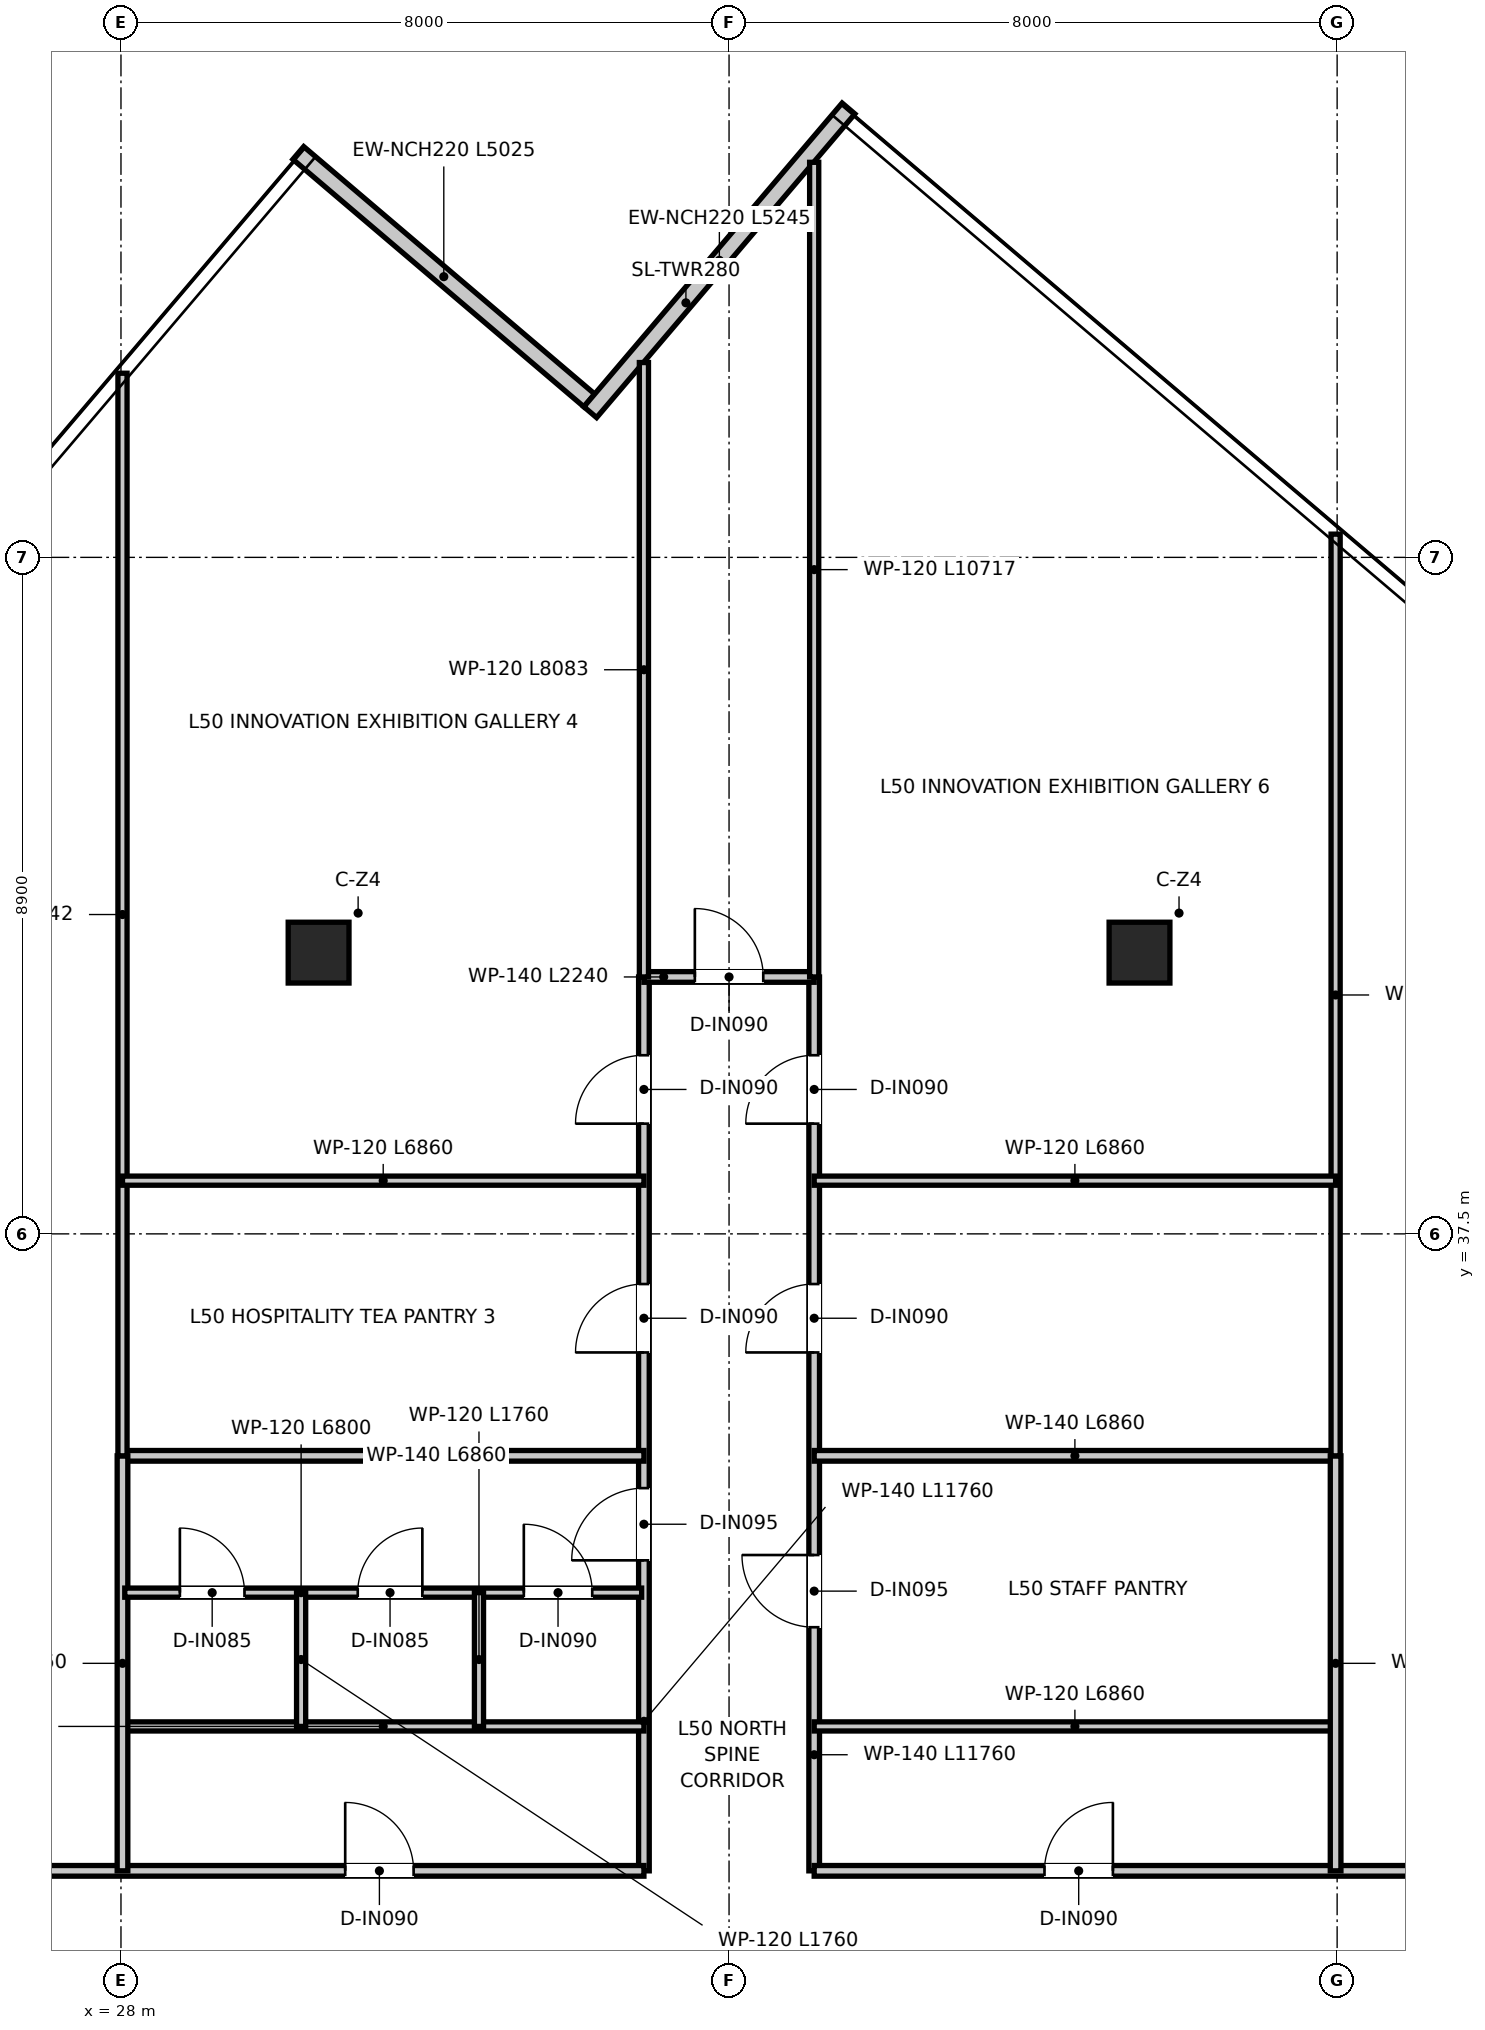
"""IFC4 building model, lengths in metres.
Left out: names, types, materials, properties, quantities, classifications, styles, units other than length and angle.
Written with IfcOpenShell. Run it as: python <this file> out.ifc"""

import sys

from ifc_helpers import new_model, si_unit, direction, frame, frame_2d, origin, origin_2d, place, context, subcontext, project, spatial, rectangle, extrude, source, transform, mapped, element, fill, save


model = new_model("IFC4")
c1 = context("Model", 3, precision=1e-05, world=origin(), true_north=direction((0.0, 1.0)))
c2 = subcontext(c1, "Body", "Model", "MODEL_VIEW")
j1 = project(units=[si_unit("LENGTHUNIT", "METRE"), si_unit("PLANEANGLEUNIT", "RADIAN")], contexts=[c1])
p1 = place(None, origin())
s1 = spatial("IfcSite", under=j1, at=p1, CompositionType="ELEMENT")
p2 = place(p1, origin())
s2 = spatial("IfcBuilding", under=s1, at=p2, CompositionType="ELEMENT")
p3 = place(p2, frame((0.0, 0.0, 207.3)))
s3 = spatial("IfcBuildingStorey", under=s2, at=p3, CompositionType="ELEMENT", Elevation=207.3)
m1 = source(origin(), c2, "Body", "SweptSolid", [
    extrude(rectangle(XDim=0.8, YDim=0.8, at=origin_2d()), origin(), (0.0, 0.0, 1.0), 3.95),
])
for number, where, z_axis, x_axis in (
    (1, (30.6, 41.2, 0.0), (0.0, 0.0, 1.0), (1.0, 0.0, 0.0)),
    (2, (41.4, 41.2, 0.0), (0.0, 0.0, 1.0), (1.0, 0.0, 0.0)),
):
    element("IfcColumn", number, at=place(p3, frame(where, z_axis=z_axis, x_axis=x_axis)), inside=s3, PredefinedType="COLUMN", context=c2, shape_type="MappedRepresentation", body=[
        mapped(m1, transform((0.0, 0.0, 0.0), x_axis=(1.0, 0.0, 0.0), y_axis=(0.0, 1.0, 0.0), z_axis=(0.0, 0.0, 1.0), scale=1.0)),
    ])
p4 = place(p3, frame((34.161, 48.465, 0.0), z_axis=(0.0, 0.0, 1.0), x_axis=(-0.761819427757, 0.647789440707, 0.0)))
e3 = element("IfcWall", 3, at=p4, inside=s3, PredefinedType="ELEMENTEDWALL", context=c2, shape_type="SweptSolid", body=[
    extrude(rectangle(XDim=5.025, YDim=0.22, at=frame_2d((2.512, 0.0))), origin(), (0.0, 0.0, 1.0), 3.67),
])
p5 = place(p3, frame((37.572, 52.306, 0.0), z_axis=(0.0, 0.0, 1.0), x_axis=(-0.647784873465, -0.761823311346, 0.0)))
e4 = element("IfcWall", 4, at=p5, inside=s3, PredefinedType="ELEMENTEDWALL", context=c2, shape_type="SweptSolid", body=[
    extrude(rectangle(XDim=5.245, YDim=0.22, at=frame_2d((2.623, 0.0))), origin(), (0.0, 0.0, 1.0), 3.67),
])
p6 = place(p3, frame((34.88, 29.12, 0.0), z_axis=(0.0, 0.0, 1.0), x_axis=(0.0, 1.0, 0.0)))
e5 = element("IfcWall", 5, at=p6, inside=s3, PredefinedType="PARTITIONING", context=c2, shape_type="SweptSolid", body=[
    extrude(rectangle(XDim=11.76, YDim=0.14, at=frame_2d((5.88, 0.0))), origin(), (0.0, 0.0, 1.0), 3.03),
])
p7 = place(p6, frame((4.085, 0.0, 0.0)))
e6 = element("IfcOpeningElement", 6, at=p7, cuts=e5, PredefinedType="OPENING", context=c2, shape_type="SweptSolid", body=[
    extrude(rectangle(XDim=0.95, YDim=2.1, at=frame_2d((0.475, 1.05))), frame((0.0, 0.08, 0.0), z_axis=(0.0, -1.0, 0.0), x_axis=(1.0, 0.0, 0.0)), (0.0, 0.0, 1.0), 0.16),
])
p8 = place(p6, frame((6.82, 0.0, 0.0)))
e7 = element("IfcOpeningElement", 7, at=p8, cuts=e5, PredefinedType="OPENING", context=c2, shape_type="SweptSolid", body=[
    extrude(rectangle(XDim=0.9, YDim=2.1, at=frame_2d((0.45, 1.05))), frame((0.0, 0.08, 0.0), z_axis=(0.0, -1.0, 0.0), x_axis=(1.0, 0.0, 0.0)), (0.0, 0.0, 1.0), 0.16),
])
p9 = place(p6, frame((9.83, 0.0, 0.0)))
e8 = element("IfcOpeningElement", 8, at=p9, cuts=e5, PredefinedType="OPENING", context=c2, shape_type="SweptSolid", body=[
    extrude(rectangle(XDim=0.9, YDim=2.1, at=frame_2d((0.45, 1.05))), frame((0.0, 0.08, 0.0), z_axis=(0.0, -1.0, 0.0), x_axis=(1.0, 0.0, 0.0)), (0.0, 0.0, 1.0), 0.16),
])
p10 = place(p3, frame((37.12, 29.12, 0.0), z_axis=(0.0, 0.0, 1.0), x_axis=(0.0, 1.0, 0.0)))
e9 = element("IfcWall", 9, at=p10, inside=s3, PredefinedType="PARTITIONING", context=c2, shape_type="SweptSolid", body=[
    extrude(rectangle(XDim=11.76, YDim=0.14, at=frame_2d((5.88, 0.0))), origin(), (0.0, 0.0, 1.0), 3.03),
])
p11 = place(p10, frame((3.205, 0.0, 0.0)))
e10 = element("IfcOpeningElement", 10, at=p11, cuts=e9, PredefinedType="OPENING", context=c2, shape_type="SweptSolid", body=[
    extrude(rectangle(XDim=0.95, YDim=2.1, at=frame_2d((0.475, 1.05))), frame((0.0, 0.08, 0.0), z_axis=(0.0, -1.0, 0.0), x_axis=(1.0, 0.0, 0.0)), (0.0, 0.0, 1.0), 0.16),
])
p12 = place(p10, frame((6.82, 0.0, 0.0)))
e11 = element("IfcOpeningElement", 11, at=p12, cuts=e9, PredefinedType="OPENING", context=c2, shape_type="SweptSolid", body=[
    extrude(rectangle(XDim=0.9, YDim=2.1, at=frame_2d((0.45, 1.05))), frame((0.0, 0.08, 0.0), z_axis=(0.0, -1.0, 0.0), x_axis=(1.0, 0.0, 0.0)), (0.0, 0.0, 1.0), 0.16),
])
p13 = place(p10, frame((9.83, 0.0, 0.0)))
e12 = element("IfcOpeningElement", 12, at=p13, cuts=e9, PredefinedType="OPENING", context=c2, shape_type="SweptSolid", body=[
    extrude(rectangle(XDim=0.9, YDim=2.1, at=frame_2d((0.45, 1.05))), frame((0.0, 0.08, 0.0), z_axis=(0.0, -1.0, 0.0), x_axis=(1.0, 0.0, 0.0)), (0.0, 0.0, 1.0), 0.16),
])
p14 = place(p3, frame((34.88, 40.88, 0.0), z_axis=(0.0, 0.0, 1.0), x_axis=(1.0, 0.0, 0.0)))
e13 = element("IfcWall", 13, at=p14, inside=s3, PredefinedType="PARTITIONING", context=c2, shape_type="SweptSolid", body=[
    extrude(rectangle(XDim=2.24, YDim=0.14, at=frame_2d((1.12, 0.0))), origin(), (0.0, 0.0, 1.0), 3.67),
])
p15 = place(p14, frame((0.67, 0.0, 0.0)))
e14 = element("IfcOpeningElement", 14, at=p15, cuts=e13, PredefinedType="OPENING", context=c2, shape_type="SweptSolid", body=[
    extrude(rectangle(XDim=0.9, YDim=2.1, at=frame_2d((0.45, 1.05))), frame((0.0, 0.08, 0.0), z_axis=(0.0, -1.0, 0.0), x_axis=(1.0, 0.0, 0.0)), (0.0, 0.0, 1.0), 0.16),
])
p16 = place(p3, frame((11.267, 29.12, 0.0), z_axis=(0.0, 0.0, 1.0), x_axis=(1.0, 0.0, 0.0)))
e15 = element("IfcWall", 15, at=p16, inside=s3, PredefinedType="PARTITIONING", context=c2, shape_type="SweptSolid", body=[
    extrude(rectangle(XDim=23.613, YDim=0.14, at=frame_2d((11.807, 0.0))), origin(), (0.0, 0.0, 1.0), 3.03),
])
p17 = place(p16, frame((19.683, 0.0, 0.0)))
e16 = element("IfcOpeningElement", 16, at=p17, cuts=e15, PredefinedType="OPENING", context=c2, shape_type="SweptSolid", body=[
    extrude(rectangle(XDim=0.9, YDim=2.1, at=frame_2d((0.45, 1.05))), frame((0.0, 0.08, 0.0), z_axis=(0.0, -1.0, 0.0), x_axis=(1.0, 0.0, 0.0)), (0.0, 0.0, 1.0), 0.16),
])
p18 = place(p16, frame((7.809, 0.0, 0.0)))
e17 = element("IfcOpeningElement", 17, at=p18, cuts=e15, PredefinedType="OPENING", context=c2, shape_type="SweptSolid", body=[
    extrude(rectangle(XDim=0.9, YDim=2.1, at=frame_2d((0.45, 1.05))), frame((0.0, 0.08, 0.0), z_axis=(0.0, -1.0, 0.0), x_axis=(1.0, 0.0, 0.0)), (0.0, 0.0, 1.0), 0.16),
])
p19 = place(p3, frame((37.12, 29.12, 0.0), z_axis=(0.0, 0.0, 1.0), x_axis=(1.0, 0.0, 0.0)))
e18 = element("IfcWall", 18, at=p19, inside=s3, PredefinedType="PARTITIONING", context=c2, shape_type="SweptSolid", body=[
    extrude(rectangle(XDim=20.988, YDim=0.14, at=frame_2d((10.494, 0.0))), origin(), (0.0, 0.0, 1.0), 3.03),
])
p20 = place(p19, frame((3.03, 0.0, 0.0)))
e19 = element("IfcOpeningElement", 19, at=p20, cuts=e18, PredefinedType="OPENING", context=c2, shape_type="SweptSolid", body=[
    extrude(rectangle(XDim=0.9, YDim=2.1, at=frame_2d((0.45, 1.05))), frame((0.0, 0.08, 0.0), z_axis=(0.0, -1.0, 0.0), x_axis=(1.0, 0.0, 0.0)), (0.0, 0.0, 1.0), 0.16),
])
p21 = place(p19, frame((14.694, 0.0, 0.0)))
e20 = element("IfcOpeningElement", 20, at=p21, cuts=e18, PredefinedType="OPENING", context=c2, shape_type="SweptSolid", body=[
    extrude(rectangle(XDim=0.9, YDim=2.1, at=frame_2d((0.45, 1.05))), frame((0.0, 0.08, 0.0), z_axis=(0.0, -1.0, 0.0), x_axis=(1.0, 0.0, 0.0)), (0.0, 0.0, 1.0), 0.16),
])
for number, where, z_axis, x_axis in (
    (21, (28.02, 31.02, 0.0), (0.0, 0.0, 1.0), (1.0, 0.0, 0.0)),
    (22, (37.12, 31.02, 0.0), (0.0, 0.0, 1.0), (1.0, 0.0, 0.0)),
):
    element("IfcWall", number, at=place(p3, frame(where, z_axis=z_axis, x_axis=x_axis)), inside=s3, PredefinedType="PARTITIONING", context=c2, shape_type="SweptSolid", body=[
        extrude(rectangle(XDim=6.86, YDim=0.12, at=frame_2d((3.43, 0.0))), origin(), (0.0, 0.0, 1.0), 3.18),
    ])
for number, where, z_axis, x_axis in (
    (23, (28.02, 34.58, 0.0), (0.0, 0.0, 1.0), (1.0, 0.0, 0.0)),
    (24, (37.12, 34.58, 0.0), (0.0, 0.0, 1.0), (1.0, 0.0, 0.0)),
):
    element("IfcWall", number, at=place(p3, frame(where, z_axis=z_axis, x_axis=x_axis)), inside=s3, PredefinedType="PARTITIONING", context=c2, shape_type="SweptSolid", body=[
        extrude(rectangle(XDim=6.86, YDim=0.14, at=frame_2d((3.43, 0.0))), origin(), (0.0, 0.0, 1.0), 3.18),
    ])
for number, where, z_axis, x_axis in (
    (25, (28.02, 29.12, 0.0), (0.0, 0.0, 1.0), (0.0, 1.0, 0.0)),
    (26, (43.98, 29.12, 0.0), (0.0, 0.0, 1.0), (0.0, 1.0, 0.0)),
):
    element("IfcWall", number, at=place(p3, frame(where, z_axis=z_axis, x_axis=x_axis)), inside=s3, PredefinedType="PARTITIONING", context=c2, shape_type="SweptSolid", body=[
        extrude(rectangle(XDim=5.46, YDim=0.14, at=frame_2d((2.73, 0.0))), origin(), (0.0, 0.0, 1.0), 3.37),
    ])
p22 = place(p3, frame((28.05, 32.78, 0.0), z_axis=(0.0, 0.0, 1.0), x_axis=(1.0, 0.0, 0.0)))
e27 = element("IfcWall", 27, at=p22, inside=s3, PredefinedType="PARTITIONING", context=c2, shape_type="SweptSolid", body=[
    extrude(rectangle(XDim=6.8, YDim=0.12, at=frame_2d((3.4, 0.0))), origin(), (0.0, 0.0, 1.0), 3.18),
])
p23 = place(p22, frame((0.725, 0.0, 0.0)))
e28 = element("IfcOpeningElement", 28, at=p23, cuts=e27, PredefinedType="OPENING", context=c2, shape_type="SweptSolid", body=[
    extrude(rectangle(XDim=0.85, YDim=2.1, at=frame_2d((0.425, 1.05))), frame((0.0, 0.07, 0.0), z_axis=(0.0, -1.0, 0.0), x_axis=(1.0, 0.0, 0.0)), (0.0, 0.0, 1.0), 0.14),
])
p24 = place(p22, frame((3.065, 0.0, 0.0)))
e29 = element("IfcOpeningElement", 29, at=p24, cuts=e27, PredefinedType="OPENING", context=c2, shape_type="SweptSolid", body=[
    extrude(rectangle(XDim=0.85, YDim=2.1, at=frame_2d((0.425, 1.05))), frame((0.0, 0.07, 0.0), z_axis=(0.0, -1.0, 0.0), x_axis=(1.0, 0.0, 0.0)), (0.0, 0.0, 1.0), 0.14),
])
p25 = place(p22, frame((5.25, 0.0, 0.0)))
e30 = element("IfcOpeningElement", 30, at=p25, cuts=e27, PredefinedType="OPENING", context=c2, shape_type="SweptSolid", body=[
    extrude(rectangle(XDim=0.9, YDim=2.1, at=frame_2d((0.45, 1.05))), frame((0.0, 0.07, 0.0), z_axis=(0.0, -1.0, 0.0), x_axis=(1.0, 0.0, 0.0)), (0.0, 0.0, 1.0), 0.14),
])
p26 = place(p3, frame((30.37, 31.02, 0.0), z_axis=(0.0, 0.0, 1.0), x_axis=(0.0, 1.0, 0.0)))
e31 = element("IfcWall", 31, at=p26, inside=s3, PredefinedType="PARTITIONING", context=c2, shape_type="SweptSolid", body=[
    extrude(rectangle(XDim=1.76, YDim=0.12, at=frame_2d((0.88, 0.0))), origin(), (0.0, 0.0, 1.0), 3.18),
])
p27 = place(p3, frame((32.71, 31.02, 0.0), z_axis=(0.0, 0.0, 1.0), x_axis=(0.0, 1.0, 0.0)))
e32 = element("IfcWall", 32, at=p27, inside=s3, PredefinedType="PARTITIONING", context=c2, shape_type="SweptSolid", body=[
    extrude(rectangle(XDim=1.76, YDim=0.12, at=frame_2d((0.88, 0.0))), origin(), (0.0, 0.0, 1.0), 3.67),
])
p28 = place(p3, frame((34.88, 40.88, 0.0), z_axis=(0.0, 0.0, 1.0), x_axis=(0.0, 1.0, 0.0)))
e33 = element("IfcWall", 33, at=p28, inside=s3, PredefinedType="PARTITIONING", context=c2, shape_type="SweptSolid", body=[
    extrude(rectangle(XDim=8.083, YDim=0.12, at=frame_2d((4.042, 0.0))), origin(), (0.0, 0.0, 1.0), 3.28),
])
p29 = place(p3, frame((37.12, 40.88, 0.0), z_axis=(0.0, 0.0, 1.0), x_axis=(0.0, 1.0, 0.0)))
e34 = element("IfcWall", 34, at=p29, inside=s3, PredefinedType="PARTITIONING", context=c2, shape_type="SweptSolid", body=[
    extrude(rectangle(XDim=10.718, YDim=0.12, at=frame_2d((5.359, 0.0))), origin(), (0.0, 0.0, 1.0), 3.28),
])
p30 = place(p3, frame((28.02, 34.58, 0.0), z_axis=(0.0, 0.0, 1.0), x_axis=(0.0, 1.0, 0.0)))
e35 = element("IfcWall", 35, at=p30, inside=s3, PredefinedType="PARTITIONING", context=c2, shape_type="SweptSolid", body=[
    extrude(rectangle(XDim=14.242, YDim=0.12, at=frame_2d((7.121, 0.0))), origin(), (0.0, 0.0, 1.0), 3.03),
])
p31 = place(p3, frame((43.98, 34.58, 0.0), z_axis=(0.0, 0.0, 1.0), x_axis=(0.0, 1.0, 0.0)))
e36 = element("IfcWall", 36, at=p31, inside=s3, PredefinedType="PARTITIONING", context=c2, shape_type="SweptSolid", body=[
    extrude(rectangle(XDim=12.125, YDim=0.12, at=frame_2d((6.063, 0.0))), origin(), (0.0, 0.0, 1.0), 3.03),
])
for number, where, z_axis, x_axis in (
    (37, (28.02, 38.2, 0.0), (0.0, 0.0, 1.0), (1.0, 0.0, 0.0)),
    (38, (37.12, 38.2, 0.0), (0.0, 0.0, 1.0), (1.0, 0.0, 0.0)),
):
    element("IfcWall", number, at=place(p3, frame(where, z_axis=z_axis, x_axis=x_axis)), inside=s3, PredefinedType="PARTITIONING", context=c2, shape_type="SweptSolid", body=[
        extrude(rectangle(XDim=6.86, YDim=0.12, at=frame_2d((3.43, 0.0))), origin(), (0.0, 0.0, 1.0), 3.18),
    ])
p32 = place(p17, origin())
e39 = element("IfcDoor", 39, at=p32, inside=s3, OperationType="SINGLE_SWING_LEFT", PredefinedType="DOOR", context=c2, shape_type="SweptSolid", body=[
    extrude(rectangle(XDim=0.9, YDim=2.1, at=frame_2d((0.45, 1.05))), frame((0.0, 0.025, 0.0), z_axis=(0.0, -1.0, 0.0), x_axis=(1.0, 0.0, 0.0)), (0.0, 0.0, 1.0), 0.05),
])
fill(e16, e39)
p33 = place(p20, origin())
e40 = element("IfcDoor", 40, at=p33, inside=s3, OperationType="SINGLE_SWING_RIGHT", PredefinedType="DOOR", context=c2, shape_type="SweptSolid", body=[
    extrude(rectangle(XDim=0.9, YDim=2.1, at=frame_2d((0.45, 1.05))), frame((0.0, 0.025, 0.0), z_axis=(0.0, -1.0, 0.0), x_axis=(1.0, 0.0, 0.0)), (0.0, 0.0, 1.0), 0.05),
])
fill(e19, e40)
p34 = place(p7, origin())
e41 = element("IfcDoor", 41, at=p34, inside=s3, OperationType="SINGLE_SWING_LEFT", PredefinedType="DOOR", context=c2, shape_type="SweptSolid", body=[
    extrude(rectangle(XDim=0.95, YDim=2.1, at=frame_2d((0.475, 1.05))), frame((0.0, 0.025, 0.0), z_axis=(0.0, -1.0, 0.0), x_axis=(1.0, 0.0, 0.0)), (0.0, 0.0, 1.0), 0.05),
])
fill(e6, e41)
p35 = place(p11, origin())
e42 = element("IfcDoor", 42, at=p35, inside=s3, OperationType="SINGLE_SWING_RIGHT", PredefinedType="DOOR", context=c2, shape_type="SweptSolid", body=[
    extrude(rectangle(XDim=0.95, YDim=2.1, at=frame_2d((0.475, 1.05))), frame((0.0, 0.025, 0.0), z_axis=(0.0, -1.0, 0.0), x_axis=(1.0, 0.0, 0.0)), (0.0, 0.0, 1.0), 0.05),
])
fill(e10, e42)
p36 = place(p23, origin())
e43 = element("IfcDoor", 43, at=p36, inside=s3, OperationType="SINGLE_SWING_LEFT", PredefinedType="DOOR", context=c2, shape_type="SweptSolid", body=[
    extrude(rectangle(XDim=0.85, YDim=2.1, at=frame_2d((0.425, 1.05))), frame((0.0, 0.025, 0.0), z_axis=(0.0, -1.0, 0.0), x_axis=(1.0, 0.0, 0.0)), (0.0, 0.0, 1.0), 0.05),
])
fill(e28, e43)
p37 = place(p24, origin())
e44 = element("IfcDoor", 44, at=p37, inside=s3, OperationType="SINGLE_SWING_RIGHT", PredefinedType="DOOR", context=c2, shape_type="SweptSolid", body=[
    extrude(rectangle(XDim=0.85, YDim=2.1, at=frame_2d((0.425, 1.05))), frame((0.0, 0.025, 0.0), z_axis=(0.0, -1.0, 0.0), x_axis=(1.0, 0.0, 0.0)), (0.0, 0.0, 1.0), 0.05),
])
fill(e29, e44)
p38 = place(p25, origin())
e45 = element("IfcDoor", 45, at=p38, inside=s3, OperationType="SINGLE_SWING_LEFT", PredefinedType="DOOR", context=c2, shape_type="SweptSolid", body=[
    extrude(rectangle(XDim=0.9, YDim=2.1, at=frame_2d((0.45, 1.05))), frame((0.0, 0.025, 0.0), z_axis=(0.0, -1.0, 0.0), x_axis=(1.0, 0.0, 0.0)), (0.0, 0.0, 1.0), 0.05),
])
fill(e30, e45)
p39 = place(p15, origin())
e46 = element("IfcDoor", 46, at=p39, inside=s3, OperationType="SINGLE_SWING_LEFT", PredefinedType="DOOR", context=c2, shape_type="SweptSolid", body=[
    extrude(rectangle(XDim=0.9, YDim=2.1, at=frame_2d((0.45, 1.05))), frame((0.0, 0.025, 0.0), z_axis=(0.0, -1.0, 0.0), x_axis=(1.0, 0.0, 0.0)), (0.0, 0.0, 1.0), 0.05),
])
fill(e14, e46)
p40 = place(p8, origin())
e47 = element("IfcDoor", 47, at=p40, inside=s3, OperationType="SINGLE_SWING_LEFT", PredefinedType="DOOR", context=c2, shape_type="SweptSolid", body=[
    extrude(rectangle(XDim=0.9, YDim=2.1, at=frame_2d((0.45, 1.05))), frame((0.0, 0.025, 0.0), z_axis=(0.0, -1.0, 0.0), x_axis=(1.0, 0.0, 0.0)), (0.0, 0.0, 1.0), 0.05),
])
fill(e7, e47)
p41 = place(p9, origin())
e48 = element("IfcDoor", 48, at=p41, inside=s3, OperationType="SINGLE_SWING_LEFT", PredefinedType="DOOR", context=c2, shape_type="SweptSolid", body=[
    extrude(rectangle(XDim=0.9, YDim=2.1, at=frame_2d((0.45, 1.05))), frame((0.0, 0.025, 0.0), z_axis=(0.0, -1.0, 0.0), x_axis=(1.0, 0.0, 0.0)), (0.0, 0.0, 1.0), 0.05),
])
fill(e8, e48)
p42 = place(p12, origin())
e49 = element("IfcDoor", 49, at=p42, inside=s3, OperationType="SINGLE_SWING_LEFT", PredefinedType="DOOR", context=c2, shape_type="SweptSolid", body=[
    extrude(rectangle(XDim=0.9, YDim=2.1, at=frame_2d((0.45, 1.05))), frame((0.0, 0.025, 0.0), z_axis=(0.0, -1.0, 0.0), x_axis=(1.0, 0.0, 0.0)), (0.0, 0.0, 1.0), 0.05),
])
fill(e11, e49)
p43 = place(p13, origin())
e50 = element("IfcDoor", 50, at=p43, inside=s3, OperationType="SINGLE_SWING_LEFT", PredefinedType="DOOR", context=c2, shape_type="SweptSolid", body=[
    extrude(rectangle(XDim=0.9, YDim=2.1, at=frame_2d((0.45, 1.05))), frame((0.0, 0.025, 0.0), z_axis=(0.0, -1.0, 0.0), x_axis=(1.0, 0.0, 0.0)), (0.0, 0.0, 1.0), 0.05),
])
fill(e12, e50)
save(model, sys.argv[1])
